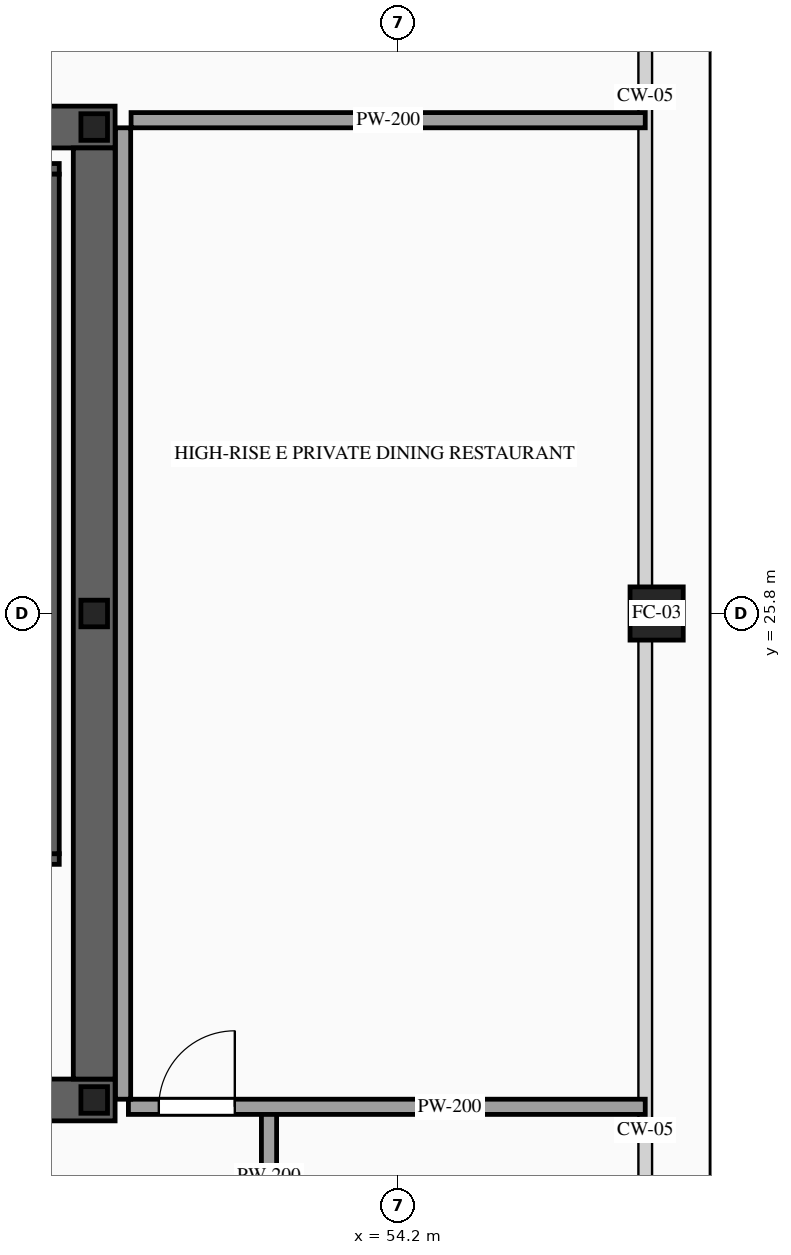
"""IFC4 building model, lengths in metres.
Left out: names, types, materials, properties, quantities, classifications, styles, units other than length and angle.
Written with IfcOpenShell. Run it as: python <this file> out.ifc"""

import sys

from ifc_helpers import new_model, si_unit, direction, frame, frame_2d, origin, origin_2d, place, context, subcontext, project, spatial, rectangle, hollow_rectangle, i_section, extrude, source, transform, mapped, element, fill, save


model = new_model("IFC4")
c1 = context("Model", 3, precision=1e-05, world=origin(), true_north=direction((0.0, 1.0)))
c2 = subcontext(c1, "Body", "Model", "MODEL_VIEW")
j1 = project(units=[si_unit("LENGTHUNIT", "METRE"), si_unit("PLANEANGLEUNIT", "RADIAN")], contexts=[c1])
p1 = place(None, origin())
s1 = spatial("IfcSite", under=j1, at=p1, CompositionType="ELEMENT")
p2 = place(p1, origin())
s2 = spatial("IfcBuilding", under=s1, at=p2, CompositionType="ELEMENT")
p3 = place(p2, frame((0.0, 0.0, 282.1)))
s3 = spatial("IfcBuildingStorey", under=s2, at=p3, CompositionType="ELEMENT", Elevation=282.1)
p4 = place(p3, frame((23.525, 19.4, 0.0), z_axis=(0.0, 0.0, 1.0), x_axis=(1.0, 0.0, 0.0)))
e1 = element("IfcWall", 1, at=p4, inside=s3, PredefinedType="SHEAR", context=c2, shape_type="SweptSolid", body=[
    extrude(rectangle(XDim=26.95, YDim=0.55, at=frame_2d((13.475, 0.0))), origin(), (0.0, 0.0, 1.0), 3.5),
])
p5 = place(p4, frame((1.925, 0.0, 0.0)))
e2 = element("IfcOpeningElement", 2, at=p5, cuts=e1, PredefinedType="OPENING", context=c2, shape_type="SweptSolid", body=[
    extrude(rectangle(XDim=1.1, YDim=2.2, at=frame_2d((0.55, 1.1))), frame((0.0, 0.29, 0.0), z_axis=(0.0, -1.0, 0.0), x_axis=(1.0, 0.0, 0.0)), (0.0, 0.0, 1.0), 0.58),
])
p6 = place(p4, frame((9.825, 0.0, 0.0)))
e3 = element("IfcOpeningElement", 3, at=p6, cuts=e1, PredefinedType="OPENING", context=c2, shape_type="SweptSolid", body=[
    extrude(rectangle(XDim=1.1, YDim=2.2, at=frame_2d((0.55, 1.1))), frame((0.0, 0.29, 0.0), z_axis=(0.0, -1.0, 0.0), x_axis=(1.0, 0.0, 0.0)), (0.0, 0.0, 1.0), 0.58),
])
p7 = place(p4, frame((23.025, 0.0, 0.0)))
e4 = element("IfcOpeningElement", 4, at=p7, cuts=e1, PredefinedType="OPENING", context=c2, shape_type="SweptSolid", body=[
    extrude(rectangle(XDim=1.1, YDim=2.2, at=frame_2d((0.55, 1.1))), frame((0.0, 0.29, 0.0), z_axis=(0.0, -1.0, 0.0), x_axis=(1.0, 0.0, 0.0)), (0.0, 0.0, 1.0), 0.58),
])
p8 = place(p4, frame((19.645, 0.0, 0.0)))
e5 = element("IfcOpeningElement", 5, at=p8, cuts=e1, PredefinedType="OPENING", context=c2, shape_type="SweptSolid", body=[
    extrude(rectangle(XDim=0.9, YDim=2.15, at=frame_2d((0.45, 1.075))), frame((0.0, 0.29, 0.0), z_axis=(0.0, -1.0, 0.0), x_axis=(1.0, 0.0, 0.0)), (0.0, 0.0, 1.0), 0.58),
])
p9 = place(p4, frame((18.205, 0.0, 0.0)))
e6 = element("IfcOpeningElement", 6, at=p9, cuts=e1, PredefinedType="OPENING", context=c2, shape_type="SweptSolid", body=[
    extrude(rectangle(XDim=0.9, YDim=2.15, at=frame_2d((0.45, 1.075))), frame((0.0, 0.29, 0.0), z_axis=(0.0, -1.0, 0.0), x_axis=(1.0, 0.0, 0.0)), (0.0, 0.0, 1.0), 0.58),
])
p10 = place(p3, frame((23.525, 32.2, 0.0), z_axis=(0.0, 0.0, 1.0), x_axis=(1.0, 0.0, 0.0)))
e7 = element("IfcWall", 7, at=p10, inside=s3, PredefinedType="SHEAR", context=c2, shape_type="SweptSolid", body=[
    extrude(rectangle(XDim=26.95, YDim=0.55, at=frame_2d((13.475, 0.0))), origin(), (0.0, 0.0, 1.0), 3.5),
])
p11 = place(p10, frame((4.545, 0.0, 0.0)))
e8 = element("IfcOpeningElement", 8, at=p11, cuts=e7, PredefinedType="OPENING", context=c2, shape_type="SweptSolid", body=[
    extrude(rectangle(XDim=0.9, YDim=2.15, at=frame_2d((0.45, 1.075))), frame((0.0, 0.29, 0.0), z_axis=(0.0, -1.0, 0.0), x_axis=(1.0, 0.0, 0.0)), (0.0, 0.0, 1.0), 0.58),
])
p12 = place(p10, frame((9.825, 0.0, 0.0)))
e9 = element("IfcOpeningElement", 9, at=p12, cuts=e7, PredefinedType="OPENING", context=c2, shape_type="SweptSolid", body=[
    extrude(rectangle(XDim=1.1, YDim=2.2, at=frame_2d((0.55, 1.1))), frame((0.0, 0.29, 0.0), z_axis=(0.0, -1.0, 0.0), x_axis=(1.0, 0.0, 0.0)), (0.0, 0.0, 1.0), 0.58),
])
p13 = place(p10, frame((15.675, 0.0, 0.0)))
e10 = element("IfcOpeningElement", 10, at=p13, cuts=e7, PredefinedType="OPENING", context=c2, shape_type="SweptSolid", body=[
    extrude(rectangle(XDim=1.1, YDim=2.2, at=frame_2d((0.55, 1.1))), frame((0.0, 0.29, 0.0), z_axis=(0.0, -1.0, 0.0), x_axis=(1.0, 0.0, 0.0)), (0.0, 0.0, 1.0), 0.58),
])
p14 = place(p10, frame((18.775, 0.0, 0.0)))
e11 = element("IfcOpeningElement", 11, at=p14, cuts=e7, PredefinedType="OPENING", context=c2, shape_type="SweptSolid", body=[
    extrude(rectangle(XDim=1.1, YDim=2.2, at=frame_2d((0.55, 1.1))), frame((0.0, 0.29, 0.0), z_axis=(0.0, -1.0, 0.0), x_axis=(1.0, 0.0, 0.0)), (0.0, 0.0, 1.0), 0.58),
])
m1 = source(origin(), c2, "Body", "SweptSolid", [
    extrude(rectangle(XDim=12.25, YDim=0.55, at=frame_2d((6.125, 0.0))), origin(), (0.0, 0.0, 1.0), 3.5),
])
p15 = place(p3, frame((50.2, 19.675, 0.0), z_axis=(0.0, 0.0, 1.0), x_axis=(0.0, 1.0, 0.0)))
e12 = element("IfcWall", 12, at=p15, inside=s3, PredefinedType="SHEAR", context=c2, shape_type="MappedRepresentation", body=[
    mapped(m1, transform((0.0, 0.0, 0.0), scale=1.0)),
])
m2 = source(origin(), c2, "Body", "SweptSolid", [
    extrude(i_section(OverallWidth=0.35, OverallDepth=0.35, WebThickness=0.012, FlangeThickness=0.019, at=origin_2d()), origin(), (0.0, 0.0, 1.0), 3.5),
])
for number, where, z_axis, x_axis in (
    (13, (50.2, 19.4, 0.0), (0.0, 0.0, 1.0), (1.0, 0.0, 0.0)),
    (14, (50.2, 25.8, 0.0), (0.0, 0.0, 1.0), (1.0, 0.0, 0.0)),
    (15, (50.2, 32.2, 0.0), (0.0, 0.0, 1.0), (1.0, 0.0, 0.0)),
):
    element("IfcColumn", number, at=place(p3, frame(where, z_axis=z_axis, x_axis=x_axis)), inside=s3, PredefinedType="COLUMN", context=c2, shape_type="MappedRepresentation", body=[
        mapped(m2, transform((0.0, 0.0, 0.0), scale=1.0)),
    ])
m3 = source(origin(), c2, "Body", "SweptSolid", [
    extrude(hollow_rectangle(XDim=0.7, YDim=0.7, WallThickness=0.032, at=origin_2d()), origin(), (0.0, 0.0, 1.0), 3.28),
])
p16 = place(p3, frame((57.6, 25.8, 0.0), z_axis=(0.0, 0.0, 1.0), x_axis=(1.0, 0.0, 0.0)))
e16 = element("IfcColumn", 16, at=p16, inside=s3, PredefinedType="COLUMN", context=c2, shape_type="MappedRepresentation", body=[
    mapped(m3, transform((0.0, 0.0, 0.0), scale=1.0)),
])
p17 = place(p3, frame((46.46, 22.57, 0.0), z_axis=(0.0, 0.0, 1.0), x_axis=(1.0, 0.0, 0.0)))
e17 = element("IfcWall", 17, at=p17, inside=s3, PredefinedType="SOLIDWALL", context=c2, shape_type="SweptSolid", body=[
    extrude(rectangle(XDim=3.28, YDim=0.14, at=frame_2d((1.64, 0.0))), origin(), (0.0, 0.0, 1.0), 3.28),
])
p18 = place(p17, frame((1.09, 0.0, 0.0)))
e18 = element("IfcOpeningElement", 18, at=p18, cuts=e17, PredefinedType="OPENING", context=c2, shape_type="SweptSolid", body=[
    extrude(rectangle(XDim=1.1, YDim=2.2, at=frame_2d((0.55, 1.1))), frame((0.0, 0.085, 0.0), z_axis=(0.0, -1.0, 0.0), x_axis=(1.0, 0.0, 0.0)), (0.0, 0.0, 1.0), 0.17),
])
m4 = source(origin(), c2, "Body", "SweptSolid", [
    extrude(rectangle(XDim=3.28, YDim=0.14, at=frame_2d((1.64, 0.0))), origin(), (0.0, 0.0, 1.0), 3.28),
])
p19 = place(p3, frame((46.46, 31.65, 0.0), z_axis=(0.0, 0.0, 1.0), x_axis=(1.0, 0.0, 0.0)))
e19 = element("IfcWall", 19, at=p19, inside=s3, PredefinedType="SOLIDWALL", context=c2, shape_type="MappedRepresentation", body=[
    mapped(m4, transform((0.0, 0.0, 0.0), scale=1.0)),
])
m5 = source(origin(), c2, "Body", "SweptSolid", [
    extrude(rectangle(XDim=8.94, YDim=0.14, at=frame_2d((4.47, 0.0))), origin(), (0.0, 0.0, 1.0), 3.28),
])
p20 = place(p3, frame((49.67, 22.64, 0.0), z_axis=(0.0, 0.0, 1.0), x_axis=(0.0, 1.0, 0.0)))
e20 = element("IfcWall", 20, at=p20, inside=s3, PredefinedType="SOLIDWALL", context=c2, shape_type="MappedRepresentation", body=[
    mapped(m5, transform((0.0, 0.0, 0.0), scale=1.0)),
])
m6 = source(origin(), c2, "Body", "SweptSolid", [
    extrude(rectangle(XDim=1.7, YDim=0.2, at=frame_2d((0.85, 0.0))), origin(), (0.0, 0.0, 1.0), 3.28),
])
p21 = place(p3, frame((52.5, 17.55, 0.0), z_axis=(0.0, 0.0, 1.0), x_axis=(0.0, 1.0, 0.0)))
e21 = element("IfcWall", 21, at=p21, inside=s3, PredefinedType="PARTITIONING", context=c2, shape_type="MappedRepresentation", body=[
    mapped(m6, transform((0.0, 0.0, 0.0), scale=1.0)),
])
p22 = place(p3, frame((50.65, 19.31, 0.0), z_axis=(0.0, 0.0, 1.0), x_axis=(1.0, 0.0, 0.0)))
e22 = element("IfcWall", 22, at=p22, inside=s3, PredefinedType="PARTITIONING", context=c2, shape_type="SweptSolid", body=[
    extrude(rectangle(XDim=6.8, YDim=0.2, at=frame_2d((3.4, 0.0))), origin(), (0.0, 0.0, 1.0), 3.28),
])
p23 = place(p22, frame((0.4, 0.0, 0.0)))
e23 = element("IfcOpeningElement", 23, at=p23, cuts=e22, PredefinedType="OPENING", context=c2, shape_type="SweptSolid", body=[
    extrude(rectangle(XDim=1.0, YDim=2.2, at=frame_2d((0.5, 1.1))), frame((0.0, 0.115, 0.0), z_axis=(0.0, -1.0, 0.0), x_axis=(1.0, 0.0, 0.0)), (0.0, 0.0, 1.0), 0.23),
])
m7 = source(origin(), c2, "Body", "SweptSolid", [
    extrude(rectangle(XDim=6.765, YDim=0.2, at=frame_2d((3.382, 0.0))), origin(), (0.0, 0.0, 1.0), 3.28),
])
p24 = place(p3, frame((50.685, 32.29, 0.0), z_axis=(0.0, 0.0, 1.0), x_axis=(1.0, 0.0, 0.0)))
e24 = element("IfcWall", 24, at=p24, inside=s3, PredefinedType="PARTITIONING", context=c2, shape_type="MappedRepresentation", body=[
    mapped(m7, transform((0.0, 0.0, 0.0), scale=1.0)),
])
m8 = source(origin(), c2, "Body", "SweptSolid", [
    extrude(rectangle(XDim=12.78, YDim=0.2, at=frame_2d((6.39, 0.0))), origin(), (0.0, 0.0, 1.0), 3.28),
])
p25 = place(p3, frame((50.58, 19.41, 0.0), z_axis=(0.0, 0.0, 1.0), x_axis=(0.0, 1.0, 0.0)))
e25 = element("IfcWall", 25, at=p25, inside=s3, PredefinedType="PARTITIONING", context=c2, shape_type="MappedRepresentation", body=[
    mapped(m8, transform((0.0, 0.0, 0.0), scale=1.0)),
])
m9 = source(origin(), c2, "Body", "SweptSolid", [
    extrude(rectangle(XDim=1.0, YDim=2.2, at=frame_2d((0.5, 1.1))), frame((0.0, 0.025, 0.0), z_axis=(0.0, -1.0, 0.0), x_axis=(1.0, 0.0, 0.0)), (0.0, 0.0, 1.0), 0.05),
])
p26 = place(p23, origin())
e26 = element("IfcDoor", 26, at=p26, inside=s3, OperationType="SINGLE_SWING_RIGHT", PredefinedType="DOOR", context=c2, shape_type="MappedRepresentation", body=[
    mapped(m9, transform((0.0, 0.0, 0.0), scale=1.0)),
])
fill(e23, e26)
save(model, sys.argv[1])
